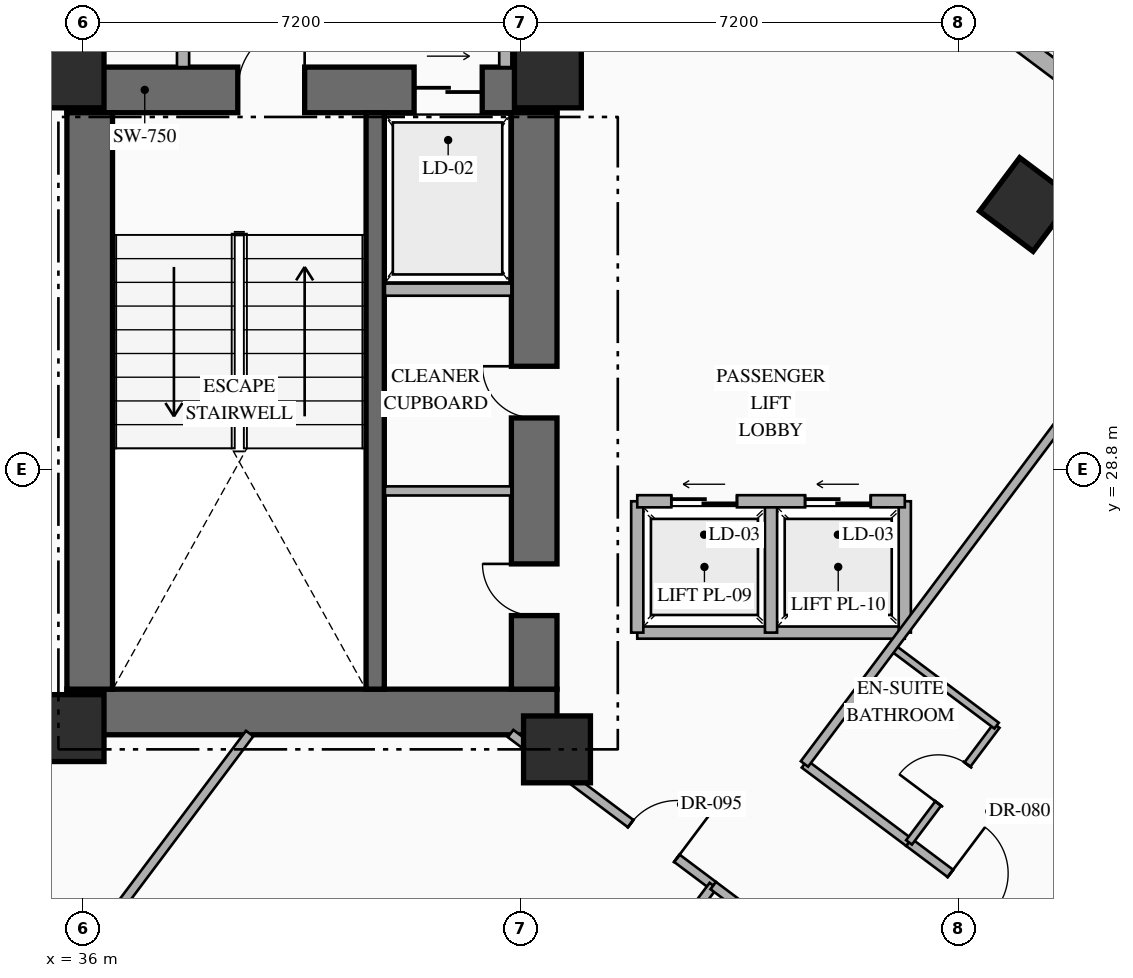
"""IFC4 building model, lengths in metres.
Left out: names, types, materials, properties, quantities, classifications, styles, units other than length and angle.
Written with IfcOpenShell. Run it as: python <this file> out.ifc"""

import sys

from ifc_helpers import new_model, si_unit, direction, frame, frame_2d, origin, origin_2d, place, context, subcontext, project, spatial, rectangle, hollow_rectangle, extrude, element, fill, save


model = new_model("IFC4")
c1 = context("Model", 3, precision=1e-05, world=origin(), true_north=direction((0.0, 1.0)))
c2 = subcontext(c1, "Body", "Model", "MODEL_VIEW")
j1 = project(units=[si_unit("LENGTHUNIT", "METRE"), si_unit("PLANEANGLEUNIT", "RADIAN")], contexts=[c1])
p1 = place(None, origin())
s1 = spatial("IfcSite", under=j1, at=p1, CompositionType="ELEMENT")
p2 = place(p1, origin())
s2 = spatial("IfcBuilding", under=s1, at=p2, CompositionType="ELEMENT")
p3 = place(p2, frame((0.0, 0.0, 36.6)))
s3 = spatial("IfcBuildingStorey", under=s2, at=p3, CompositionType="ELEMENT", Elevation=36.6)
p4 = place(p3, frame((35.74, 24.815, 0.0), z_axis=(0.0, 0.0, 1.0), x_axis=(1.0, 0.0, 0.0)))
e1 = element("IfcWall", 1, at=p4, inside=s3, PredefinedType="SHEAR", context=c2, shape_type="SweptSolid", body=[
    extrude(rectangle(XDim=8.06, YDim=0.75, at=frame_2d((4.03, 0.0))), origin(), (0.0, 0.0, 1.0), 3.35),
])
p5 = place(p3, frame((35.74, 35.045, 0.0), z_axis=(0.0, 0.0, 1.0), x_axis=(1.0, 0.0, 0.0)))
e2 = element("IfcWall", 2, at=p5, inside=s3, PredefinedType="SHEAR", context=c2, shape_type="SweptSolid", body=[
    extrude(rectangle(XDim=8.06, YDim=0.75, at=frame_2d((4.03, 0.0))), origin(), (0.0, 0.0, 1.0), 3.35),
])
p6 = place(p5, frame((2.81, 0.0, 0.0)))
e3 = element("IfcOpeningElement", 3, at=p6, cuts=e2, PredefinedType="OPENING", context=c2, shape_type="SweptSolid", body=[
    extrude(rectangle(XDim=1.1, YDim=2.2, at=frame_2d((0.55, 1.1))), frame((0.0, 0.385, 0.0), z_axis=(0.0, -1.0, 0.0), x_axis=(1.0, 0.0, 0.0)), (0.0, 0.0, 1.0), 0.77),
])
p7 = place(p5, frame((5.71, 0.0, 0.0)))
e4 = element("IfcOpeningElement", 4, at=p7, cuts=e2, PredefinedType="OPENING", context=c2, shape_type="SweptSolid", body=[
    extrude(rectangle(XDim=1.12, YDim=2.15, at=frame_2d((0.56, 1.075))), frame((0.0, 0.385, 0.0), z_axis=(0.0, -1.0, 0.0), x_axis=(1.0, 0.0, 0.0)), (0.0, 0.0, 1.0), 0.77),
])
p8 = place(p3, frame((36.115, 25.19, 0.0), z_axis=(0.0, 0.0, 1.0), x_axis=(0.0, 1.0, 0.0)))
e5 = element("IfcWall", 5, at=p8, inside=s3, PredefinedType="SHEAR", context=c2, shape_type="SweptSolid", body=[
    extrude(rectangle(XDim=9.48, YDim=0.75, at=frame_2d((4.74, 0.0))), origin(), (0.0, 0.0, 1.0), 3.35),
])
p9 = place(p3, frame((43.425, 25.19, 0.0), z_axis=(0.0, 0.0, 1.0), x_axis=(0.0, 1.0, 0.0)))
e6 = element("IfcWall", 6, at=p9, inside=s3, PredefinedType="SHEAR", context=c2, shape_type="SweptSolid", body=[
    extrude(rectangle(XDim=9.48, YDim=0.75, at=frame_2d((4.74, 0.0))), origin(), (0.0, 0.0, 1.0), 3.35),
])
p10 = place(p9, frame((1.21, 0.0, 0.0)))
e7 = element("IfcOpeningElement", 7, at=p10, cuts=e6, PredefinedType="OPENING", context=c2, shape_type="SweptSolid", body=[
    extrude(rectangle(XDim=0.85, YDim=2.08, at=frame_2d((0.425, 1.04))), frame((0.0, 0.385, 0.0), z_axis=(0.0, -1.0, 0.0), x_axis=(1.0, 0.0, 0.0)), (0.0, 0.0, 1.0), 0.77),
])
p11 = place(p9, frame((4.46, 0.0, 0.0)))
e8 = element("IfcOpeningElement", 8, at=p11, cuts=e6, PredefinedType="OPENING", context=c2, shape_type="SweptSolid", body=[
    extrude(rectangle(XDim=0.85, YDim=2.08, at=frame_2d((0.425, 1.04))), frame((0.0, 0.385, 0.0), z_axis=(0.0, -1.0, 0.0), x_axis=(1.0, 0.0, 0.0)), (0.0, 0.0, 1.0), 0.77),
])
p12 = place(p3, frame((40.81, 25.19, 0.0), z_axis=(0.0, 0.0, 1.0), x_axis=(0.0, 1.0, 0.0)))
e9 = element("IfcWall", 9, at=p12, inside=s3, PredefinedType="SHEAR", context=c2, shape_type="SweptSolid", body=[
    extrude(rectangle(XDim=9.48, YDim=0.3, at=frame_2d((4.74, 0.0))), origin(), (0.0, 0.0, 1.0), 3.35),
])
for number, where, z_axis, x_axis in (
    (10, (35.8, 24.55, 0.0), (0.0, 0.0, 1.0), (1.0, 0.0, 0.0)),
    (11, (43.8, 24.2, 0.0), (0.0, 0.0, 1.0), (1.0, 0.0, 0.0)),
    (12, (35.8, 35.3, 0.0), (0.0, 0.0, 1.0), (1.0, 0.0, 0.0)),
    (13, (43.65, 35.3, 0.0), (0.0, 0.0, 1.0), (1.0, 0.0, 0.0)),
):
    element("IfcColumn", number, at=place(p3, frame(where, z_axis=z_axis, x_axis=x_axis)), inside=s3, PredefinedType="COLUMN", context=c2, shape_type="SweptSolid", body=[
        extrude(rectangle(XDim=1.1, YDim=1.1, at=origin_2d()), origin(), (0.0, 0.0, 1.0), 3.35),
    ])
p13 = place(p3, frame((51.52, 33.16, 0.0), z_axis=(0.0, 0.0, 1.0), x_axis=(0.799999996291, -0.600000004945, 0.0)))
e14 = element("IfcColumn", 14, at=p13, inside=s3, PredefinedType="COLUMN", context=c2, shape_type="SweptSolid", body=[
    extrude(hollow_rectangle(XDim=1.1, YDim=1.1, WallThickness=0.04, at=origin_2d()), origin(), (0.0, 0.0, 1.0), 3.35),
])
p14 = place(p3, frame((44.86, 40.73, 0.0), z_axis=(0.0, 0.0, 1.0), x_axis=(0.800006902154, -0.599990797017, 0.0)))
e15 = element("IfcWall", 15, at=p14, inside=s3, PredefinedType="STANDARD", context=c2, shape_type="SweptSolid", body=[
    extrude(rectangle(XDim=29.712, YDim=0.28, at=frame_2d((14.856, 0.0))), origin(), (0.0, 0.0, 1.0), 3.13),
])
p15 = place(p14, frame((14.249, 0.0, 0.0)))
e16 = element("IfcOpeningElement", 16, at=p15, cuts=e15, PredefinedType="OPENING", context=c2, shape_type="SweptSolid", body=[
    extrude(rectangle(XDim=1.1, YDim=2.2, at=frame_2d((0.55, 1.1))), frame((0.0, 0.15, 0.0), z_axis=(0.0, -1.0, 0.0), x_axis=(1.0, 0.0, 0.0)), (0.0, 0.0, 1.0), 0.3),
])
p16 = place(p14, frame((1.612, 0.0, 0.85)))
e17 = element("IfcOpeningElement", 17, at=p16, cuts=e15, PredefinedType="OPENING", context=c2, shape_type="SweptSolid", body=[
    extrude(rectangle(XDim=1.4, YDim=1.8, at=frame_2d((0.7, 0.9))), frame((0.0, 0.15, 0.0), z_axis=(0.0, -1.0, 0.0), x_axis=(1.0, 0.0, 0.0)), (0.0, 0.0, 1.0), 0.3),
])
p17 = place(p14, frame((5.667, 0.0, 0.85)))
e18 = element("IfcOpeningElement", 18, at=p17, cuts=e15, PredefinedType="OPENING", context=c2, shape_type="SweptSolid", body=[
    extrude(rectangle(XDim=1.4, YDim=1.8, at=frame_2d((0.7, 0.9))), frame((0.0, 0.15, 0.0), z_axis=(0.0, -1.0, 0.0), x_axis=(1.0, 0.0, 0.0)), (0.0, 0.0, 1.0), 0.3),
])
p18 = place(p14, frame((9.912, 0.0, 0.85)))
e19 = element("IfcOpeningElement", 19, at=p18, cuts=e15, PredefinedType="OPENING", context=c2, shape_type="SweptSolid", body=[
    extrude(rectangle(XDim=1.4, YDim=1.8, at=frame_2d((0.7, 0.9))), frame((0.0, 0.15, 0.0), z_axis=(0.0, -1.0, 0.0), x_axis=(1.0, 0.0, 0.0)), (0.0, 0.0, 1.0), 0.3),
])
p19 = place(p14, frame((19.528, 0.0, 0.85)))
e20 = element("IfcOpeningElement", 20, at=p19, cuts=e15, PredefinedType="OPENING", context=c2, shape_type="SweptSolid", body=[
    extrude(rectangle(XDim=1.4, YDim=1.8, at=frame_2d((0.7, 0.9))), frame((0.0, 0.15, 0.0), z_axis=(0.0, -1.0, 0.0), x_axis=(1.0, 0.0, 0.0)), (0.0, 0.0, 1.0), 0.3),
])
p20 = place(p14, frame((23.451, 0.0, 0.85)))
e21 = element("IfcOpeningElement", 21, at=p20, cuts=e15, PredefinedType="OPENING", context=c2, shape_type="SweptSolid", body=[
    extrude(rectangle(XDim=1.4, YDim=1.8, at=frame_2d((0.7, 0.9))), frame((0.0, 0.15, 0.0), z_axis=(0.0, -1.0, 0.0), x_axis=(1.0, 0.0, 0.0)), (0.0, 0.0, 1.0), 0.3),
])
p21 = place(p14, frame((27.852, 0.0, 0.85)))
e22 = element("IfcOpeningElement", 22, at=p21, cuts=e15, PredefinedType="OPENING", context=c2, shape_type="SweptSolid", body=[
    extrude(rectangle(XDim=1.4, YDim=1.8, at=frame_2d((0.7, 0.9))), frame((0.0, 0.15, 0.0), z_axis=(0.0, -1.0, 0.0), x_axis=(1.0, 0.0, 0.0)), (0.0, 0.0, 1.0), 0.3),
])
p22 = place(p3, frame((53.318, 2.487, 0.0), z_axis=(0.0, 0.0, 1.0), x_axis=(-0.800004174678, 0.599994433723, 0.0)))
e23 = element("IfcWall", 23, at=p22, inside=s3, PredefinedType="STANDARD", context=c2, shape_type="SweptSolid", body=[
    extrude(rectangle(XDim=35.089, YDim=0.28, at=frame_2d((17.544, 0.0))), origin(), (0.0, 0.0, 1.0), 3.13),
])
p23 = place(p22, frame((1.931, 0.0, 0.85)))
e24 = element("IfcOpeningElement", 24, at=p23, cuts=e23, PredefinedType="OPENING", context=c2, shape_type="SweptSolid", body=[
    extrude(rectangle(XDim=1.4, YDim=1.8, at=frame_2d((0.7, 0.9))), frame((0.0, 0.15, 0.0), z_axis=(0.0, -1.0, 0.0), x_axis=(1.0, 0.0, 0.0)), (0.0, 0.0, 1.0), 0.3),
])
p24 = place(p22, frame((6.819, 0.0, 0.85)))
e25 = element("IfcOpeningElement", 25, at=p24, cuts=e23, PredefinedType="OPENING", context=c2, shape_type="SweptSolid", body=[
    extrude(rectangle(XDim=1.4, YDim=1.8, at=frame_2d((0.7, 0.9))), frame((0.0, 0.15, 0.0), z_axis=(0.0, -1.0, 0.0), x_axis=(1.0, 0.0, 0.0)), (0.0, 0.0, 1.0), 0.3),
])
p25 = place(p22, frame((11.832, 0.0, 0.85)))
e26 = element("IfcOpeningElement", 26, at=p25, cuts=e23, PredefinedType="OPENING", context=c2, shape_type="SweptSolid", body=[
    extrude(rectangle(XDim=1.4, YDim=1.8, at=frame_2d((0.7, 0.9))), frame((0.0, 0.15, 0.0), z_axis=(0.0, -1.0, 0.0), x_axis=(1.0, 0.0, 0.0)), (0.0, 0.0, 1.0), 0.3),
])
p26 = place(p22, frame((17.647, 0.0, 0.85)))
e27 = element("IfcOpeningElement", 27, at=p26, cuts=e23, PredefinedType="OPENING", context=c2, shape_type="SweptSolid", body=[
    extrude(rectangle(XDim=1.4, YDim=1.8, at=frame_2d((0.7, 0.9))), frame((0.0, 0.15, 0.0), z_axis=(0.0, -1.0, 0.0), x_axis=(1.0, 0.0, 0.0)), (0.0, 0.0, 1.0), 0.3),
])
p27 = place(p22, frame((21.857, 0.0, 0.85)))
e28 = element("IfcOpeningElement", 28, at=p27, cuts=e23, PredefinedType="OPENING", context=c2, shape_type="SweptSolid", body=[
    extrude(rectangle(XDim=1.4, YDim=1.8, at=frame_2d((0.7, 0.9))), frame((0.0, 0.15, 0.0), z_axis=(0.0, -1.0, 0.0), x_axis=(1.0, 0.0, 0.0)), (0.0, 0.0, 1.0), 0.3),
])
p28 = place(p22, frame((26.87, 0.0, 0.85)))
e29 = element("IfcOpeningElement", 29, at=p28, cuts=e23, PredefinedType="OPENING", context=c2, shape_type="SweptSolid", body=[
    extrude(rectangle(XDim=1.4, YDim=1.8, at=frame_2d((0.7, 0.9))), frame((0.0, 0.15, 0.0), z_axis=(0.0, -1.0, 0.0), x_axis=(1.0, 0.0, 0.0)), (0.0, 0.0, 1.0), 0.3),
])
p29 = place(p22, frame((31.757, 0.0, 0.85)))
e30 = element("IfcOpeningElement", 30, at=p29, cuts=e23, PredefinedType="OPENING", context=c2, shape_type="SweptSolid", body=[
    extrude(rectangle(XDim=1.4, YDim=1.8, at=frame_2d((0.7, 0.9))), frame((0.0, 0.15, 0.0), z_axis=(0.0, -1.0, 0.0), x_axis=(1.0, 0.0, 0.0)), (0.0, 0.0, 1.0), 0.3),
])
p30 = place(p3, frame((40.97, 31.76, 0.0), z_axis=(0.0, 0.0, 1.0), x_axis=(1.0, 0.0, 0.0)))
e31 = element("IfcWall", 31, at=p30, inside=s3, PredefinedType="STANDARD", context=c2, shape_type="SweptSolid", body=[
    extrude(rectangle(XDim=2.08, YDim=0.2, at=frame_2d((1.04, 0.0))), origin(), (0.0, 0.0, 1.0), 3.13),
])
p31 = place(p3, frame((40.97, 28.45, 0.0), z_axis=(0.0, 0.0, 1.0), x_axis=(1.0, 0.0, 0.0)))
e32 = element("IfcWall", 32, at=p31, inside=s3, PredefinedType="PARTITIONING", context=c2, shape_type="SweptSolid", body=[
    extrude(rectangle(XDim=2.08, YDim=0.15, at=frame_2d((1.04, 0.0))), origin(), (0.0, 0.0, 1.0), 3.13),
])
p32 = place(p3, frame((42.95, 35.42, 0.0), z_axis=(0.0, 0.0, 1.0), x_axis=(0.0, 1.0, 0.0)))
e33 = element("IfcWall", 33, at=p32, inside=s3, PredefinedType="STANDARD", context=c2, shape_type="SweptSolid", body=[
    extrude(rectangle(XDim=2.68, YDim=0.2, at=frame_2d((1.34, 0.0))), origin(), (0.0, 0.0, 1.0), 3.13),
])
p33 = place(p3, frame((37.65, 35.42, 0.0), z_axis=(0.0, 0.0, 1.0), x_axis=(0.0, 1.0, 0.0)))
e34 = element("IfcWall", 34, at=p33, inside=s3, PredefinedType="STANDARD", context=c2, shape_type="SweptSolid", body=[
    extrude(rectangle(XDim=2.68, YDim=0.2, at=frame_2d((1.34, 0.0))), origin(), (0.0, 0.0, 1.0), 3.13),
])
p34 = place(p33, frame((0.84, 0.0, 0.0)))
e35 = element("IfcOpeningElement", 35, at=p34, cuts=e34, PredefinedType="OPENING", context=c2, shape_type="SweptSolid", body=[
    extrude(rectangle(XDim=1.0, YDim=2.2, at=frame_2d((0.5, 1.1))), frame((0.0, 0.11, 0.0), z_axis=(0.0, -1.0, 0.0), x_axis=(1.0, 0.0, 0.0)), (0.0, 0.0, 1.0), 0.22),
])
p35 = place(p3, frame((45.12, 26.12, 0.0), z_axis=(0.0, 0.0, 1.0), x_axis=(1.0, 0.0, 0.0)))
e36 = element("IfcWall", 36, at=p35, inside=s3, PredefinedType="STANDARD", context=c2, shape_type="SweptSolid", body=[
    extrude(rectangle(XDim=4.4, YDim=0.2, at=frame_2d((2.2, 0.0))), origin(), (0.0, 0.0, 1.0), 3.13),
])
for number, where, z_axis, x_axis in (
    (37, (45.12, 26.12, 0.0), (0.0, 0.0, 1.0), (0.0, 1.0, 0.0)),
    (38, (49.52, 26.12, 0.0), (0.0, 0.0, 1.0), (0.0, 1.0, 0.0)),
    (39, (47.32, 26.12, 0.0), (0.0, 0.0, 1.0), (0.0, 1.0, 0.0)),
):
    element("IfcWall", number, at=place(p3, frame(where, z_axis=z_axis, x_axis=x_axis)), inside=s3, PredefinedType="STANDARD", context=c2, shape_type="SweptSolid", body=[
        extrude(rectangle(XDim=2.16, YDim=0.2, at=frame_2d((1.08, 0.0))), origin(), (0.0, 0.0, 1.0), 3.13),
    ])
p36 = place(p3, frame((45.12, 28.28, 0.0), z_axis=(0.0, 0.0, 1.0), x_axis=(1.0, 0.0, 0.0)))
e40 = element("IfcWall", 40, at=p36, inside=s3, PredefinedType="STANDARD", context=c2, shape_type="SweptSolid", body=[
    extrude(rectangle(XDim=4.4, YDim=0.2, at=frame_2d((2.2, 0.0))), origin(), (0.0, 0.0, 1.0), 3.13),
])
p37 = place(p36, frame((0.56, 0.0, 0.0)))
e41 = element("IfcOpeningElement", 41, at=p37, cuts=e40, PredefinedType="OPENING", context=c2, shape_type="SweptSolid", body=[
    extrude(rectangle(XDim=1.08, YDim=2.15, at=frame_2d((0.54, 1.075))), frame((0.0, 0.11, 0.0), z_axis=(0.0, -1.0, 0.0), x_axis=(1.0, 0.0, 0.0)), (0.0, 0.0, 1.0), 0.22),
])
p38 = place(p36, frame((2.76, 0.0, 0.0)))
e42 = element("IfcOpeningElement", 42, at=p38, cuts=e40, PredefinedType="OPENING", context=c2, shape_type="SweptSolid", body=[
    extrude(rectangle(XDim=1.08, YDim=2.15, at=frame_2d((0.54, 1.075))), frame((0.0, 0.11, 0.0), z_axis=(0.0, -1.0, 0.0), x_axis=(1.0, 0.0, 0.0)), (0.0, 0.0, 1.0), 0.22),
])
p39 = place(p3, frame((43.037, 24.46, 0.0), z_axis=(0.0, 0.0, 1.0), x_axis=(0.799971872363, -0.600037501685, 0.0)))
e43 = element("IfcWall", 43, at=p39, inside=s3, PredefinedType="PARTITIONING", context=c2, shape_type="SweptSolid", body=[
    extrude(rectangle(XDim=4.167, YDim=0.15, at=frame_2d((2.083, 0.0))), origin(), (0.0, 0.0, 1.0), 2.425),
])
p40 = place(p39, frame((2.468, 0.0, 0.0)))
e44 = element("IfcOpeningElement", 44, at=p40, cuts=e43, PredefinedType="OPENING", context=c2, shape_type="SweptSolid", body=[
    extrude(rectangle(XDim=0.95, YDim=2.15, at=frame_2d((0.475, 1.075))), frame((0.0, 0.085, 0.0), z_axis=(0.0, -1.0, 0.0), x_axis=(1.0, 0.0, 0.0)), (0.0, 0.0, 1.0), 0.17),
])
p41 = place(p3, frame((33.384, 17.312, 0.0), z_axis=(0.0, 0.0, 1.0), x_axis=(0.600008743659, 0.799993442181, 0.0)))
e45 = element("IfcWall", 45, at=p41, inside=s3, PredefinedType="PARTITIONING", context=c2, shape_type="SweptSolid", body=[
    extrude(rectangle(XDim=8.935, YDim=0.15, at=frame_2d((4.468, 0.0))), origin(), (0.0, 0.0, 1.0), 3.13),
])
p42 = place(p3, frame((39.464, 12.752, 0.0), z_axis=(0.0, 0.0, 1.0), x_axis=(0.6, 0.8, 0.0)))
e46 = element("IfcWall", 46, at=p42, inside=s3, PredefinedType="PARTITIONING", context=c2, shape_type="SweptSolid", body=[
    extrude(rectangle(XDim=11.51, YDim=0.15, at=frame_2d((5.755, 0.0))), origin(), (0.0, 0.0, 1.0), 3.13),
])
p43 = place(p3, frame((47.87, 23.96, 0.0), z_axis=(0.0, 0.0, 1.0), x_axis=(0.79998637334, -0.60001816845, 0.0)))
e47 = element("IfcWall", 47, at=p43, inside=s3, PredefinedType="PARTITIONING", context=c2, shape_type="SweptSolid", body=[
    extrude(rectangle(XDim=2.15, YDim=0.15, at=frame_2d((1.075, 0.0))), origin(), (0.0, 0.0, 1.0), 2.775),
])
p44 = place(p3, frame((49.59, 22.67, 0.0), z_axis=(0.0, 0.0, 1.0), x_axis=(0.800011056104, -0.599985258246, 0.0)))
e48 = element("IfcWall", 48, at=p44, inside=s3, PredefinedType="PARTITIONING", context=c2, shape_type="SweptSolid", body=[
    extrude(rectangle(XDim=2.65, YDim=0.15, at=frame_2d((1.325, 0.0))), origin(), (0.0, 0.0, 1.0), 2.775),
])
p45 = place(p44, frame((0.85, 0.0, 0.0)))
e49 = element("IfcOpeningElement", 49, at=p45, cuts=e48, PredefinedType="OPENING", context=c2, shape_type="SweptSolid", body=[
    extrude(rectangle(XDim=0.95, YDim=2.15, at=frame_2d((0.475, 1.075))), frame((0.0, 0.085, 0.0), z_axis=(0.0, -1.0, 0.0), x_axis=(1.0, 0.0, 0.0)), (0.0, 0.0, 1.0), 0.17),
])
p46 = place(p3, frame((49.59, 22.67, 0.0), z_axis=(0.0, 0.0, 1.0), x_axis=(0.599951172744, 0.800036618114, 0.0)))
e50 = element("IfcWall", 50, at=p46, inside=s3, PredefinedType="PARTITIONING", context=c2, shape_type="SweptSolid", body=[
    extrude(rectangle(XDim=2.4, YDim=0.12, at=frame_2d((1.2, 0.0))), origin(), (0.0, 0.0, 1.0), 3.13),
])
p47 = place(p46, frame((0.8, 0.0, 0.0)))
e51 = element("IfcOpeningElement", 51, at=p47, cuts=e50, PredefinedType="OPENING", context=c2, shape_type="SweptSolid", body=[
    extrude(rectangle(XDim=0.8, YDim=2.06, at=frame_2d((0.4, 1.03))), frame((0.0, 0.07, 0.0), z_axis=(0.0, -1.0, 0.0), x_axis=(1.0, 0.0, 0.0)), (0.0, 0.0, 1.0), 0.14),
])
p48 = place(p3, frame((49.31, 25.88, 0.0), z_axis=(0.0, 0.0, 1.0), x_axis=(0.800040880289, -0.59994548908, 0.0)))
e52 = element("IfcWall", 52, at=p48, inside=s3, PredefinedType="PARTITIONING", context=c2, shape_type="SweptSolid", body=[
    extrude(rectangle(XDim=2.15, YDim=0.12, at=frame_2d((1.075, 0.0))), origin(), (0.0, 0.0, 1.0), 3.13),
])
for number, where, z_axis, x_axis in (
    (53, (47.87, 23.96, 0.0), (0.0, 0.0, 1.0), (0.6, 0.8, 0.0)),
    (54, (51.71, 21.08, 0.0), (0.0, 0.0, 1.0), (0.6, 0.8, 0.0)),
):
    element("IfcWall", number, at=place(p3, frame(where, z_axis=z_axis, x_axis=x_axis)), inside=s3, PredefinedType="PARTITIONING", context=c2, shape_type="SweptSolid", body=[
        extrude(rectangle(XDim=11.55, YDim=0.15, at=frame_2d((5.775, 0.0))), origin(), (0.0, 0.0, 1.0), 3.13),
    ])
p49 = place(p3, frame((46.37, 21.96, 0.0), z_axis=(0.0, 0.0, 1.0), x_axis=(0.799977170108, -0.600030438649, 0.0)))
e55 = element("IfcWall", 55, at=p49, inside=s3, PredefinedType="PARTITIONING", context=c2, shape_type="SweptSolid", body=[
    extrude(rectangle(XDim=3.85, YDim=0.15, at=frame_2d((1.925, 0.0))), origin(), (0.0, 0.0, 1.0), 2.425),
])
p50 = place(p49, frame((1.45, 0.0, 0.0)))
e56 = element("IfcOpeningElement", 56, at=p50, cuts=e55, PredefinedType="OPENING", context=c2, shape_type="SweptSolid", body=[
    extrude(rectangle(XDim=0.95, YDim=2.15, at=frame_2d((0.475, 1.075))), frame((0.0, 0.085, 0.0), z_axis=(0.0, -1.0, 0.0), x_axis=(1.0, 0.0, 0.0)), (0.0, 0.0, 1.0), 0.17),
])
p51 = place(p6, origin())
e57 = element("IfcDoor", 57, at=p51, inside=s3, OperationType="SINGLE_SWING_RIGHT", PredefinedType="DOOR", context=c2, shape_type="SweptSolid", body=[
    extrude(rectangle(XDim=1.1, YDim=2.2, at=frame_2d((0.55, 1.1))), frame((0.0, 0.025, 0.0), z_axis=(0.0, -1.0, 0.0), x_axis=(1.0, 0.0, 0.0)), (0.0, 0.0, 1.0), 0.05),
])
fill(e3, e57)
p52 = place(p7, origin())
e58 = element("IfcDoor", 58, at=p52, inside=s3, OperationType="SLIDING_TO_RIGHT", PredefinedType="USERDEFINED", context=c2, shape_type="SweptSolid", body=[
    extrude(rectangle(XDim=1.12, YDim=2.15, at=frame_2d((0.56, 1.075))), frame((0.0, 0.025, 0.0), z_axis=(0.0, -1.0, 0.0), x_axis=(1.0, 0.0, 0.0)), (0.0, 0.0, 1.0), 0.05),
])
fill(e4, e58)
p53 = place(p10, origin())
e59 = element("IfcDoor", 59, at=p53, inside=s3, OperationType="SINGLE_SWING_RIGHT", PredefinedType="DOOR", context=c2, shape_type="SweptSolid", body=[
    extrude(rectangle(XDim=0.85, YDim=2.08, at=frame_2d((0.425, 1.04))), frame((0.0, 0.025, 0.0), z_axis=(0.0, -1.0, 0.0), x_axis=(1.0, 0.0, 0.0)), (0.0, 0.0, 1.0), 0.05),
])
fill(e7, e59)
p54 = place(p11, origin())
e60 = element("IfcDoor", 60, at=p54, inside=s3, OperationType="SINGLE_SWING_RIGHT", PredefinedType="DOOR", context=c2, shape_type="SweptSolid", body=[
    extrude(rectangle(XDim=0.85, YDim=2.08, at=frame_2d((0.425, 1.04))), frame((0.0, 0.025, 0.0), z_axis=(0.0, -1.0, 0.0), x_axis=(1.0, 0.0, 0.0)), (0.0, 0.0, 1.0), 0.05),
])
fill(e8, e60)
p55 = place(p37, origin())
e61 = element("IfcDoor", 61, at=p55, inside=s3, OperationType="SLIDING_TO_LEFT", PredefinedType="USERDEFINED", context=c2, shape_type="SweptSolid", body=[
    extrude(rectangle(XDim=1.08, YDim=2.15, at=frame_2d((0.54, 1.075))), frame((0.0, 0.025, 0.0), z_axis=(0.0, -1.0, 0.0), x_axis=(1.0, 0.0, 0.0)), (0.0, 0.0, 1.0), 0.05),
])
fill(e41, e61)
p56 = place(p38, origin())
e62 = element("IfcDoor", 62, at=p56, inside=s3, OperationType="SLIDING_TO_LEFT", PredefinedType="USERDEFINED", context=c2, shape_type="SweptSolid", body=[
    extrude(rectangle(XDim=1.08, YDim=2.15, at=frame_2d((0.54, 1.075))), frame((0.0, 0.025, 0.0), z_axis=(0.0, -1.0, 0.0), x_axis=(1.0, 0.0, 0.0)), (0.0, 0.0, 1.0), 0.05),
])
fill(e42, e62)
p57 = place(p40, origin())
e63 = element("IfcDoor", 63, at=p57, inside=s3, OperationType="SINGLE_SWING_RIGHT", PredefinedType="DOOR", context=c2, shape_type="SweptSolid", body=[
    extrude(rectangle(XDim=0.95, YDim=2.15, at=frame_2d((0.475, 1.075))), frame((0.0, 0.025, 0.0), z_axis=(0.0, -1.0, 0.0), x_axis=(1.0, 0.0, 0.0)), (0.0, 0.0, 1.0), 0.05),
])
fill(e44, e63)
p58 = place(p45, origin())
e64 = element("IfcDoor", 64, at=p58, inside=s3, OperationType="SINGLE_SWING_LEFT", PredefinedType="DOOR", context=c2, shape_type="SweptSolid", body=[
    extrude(rectangle(XDim=0.95, YDim=2.15, at=frame_2d((0.475, 1.075))), frame((0.0, 0.025, 0.0), z_axis=(0.0, -1.0, 0.0), x_axis=(1.0, 0.0, 0.0)), (0.0, 0.0, 1.0), 0.05),
])
fill(e49, e64)
p59 = place(p47, origin())
e65 = element("IfcDoor", 65, at=p59, inside=s3, OperationType="SINGLE_SWING_LEFT", PredefinedType="DOOR", context=c2, shape_type="SweptSolid", body=[
    extrude(rectangle(XDim=0.8, YDim=2.06, at=frame_2d((0.4, 1.03))), frame((0.0, 0.025, 0.0), z_axis=(0.0, -1.0, 0.0), x_axis=(1.0, 0.0, 0.0)), (0.0, 0.0, 1.0), 0.05),
])
fill(e51, e65)
save(model, sys.argv[1])
